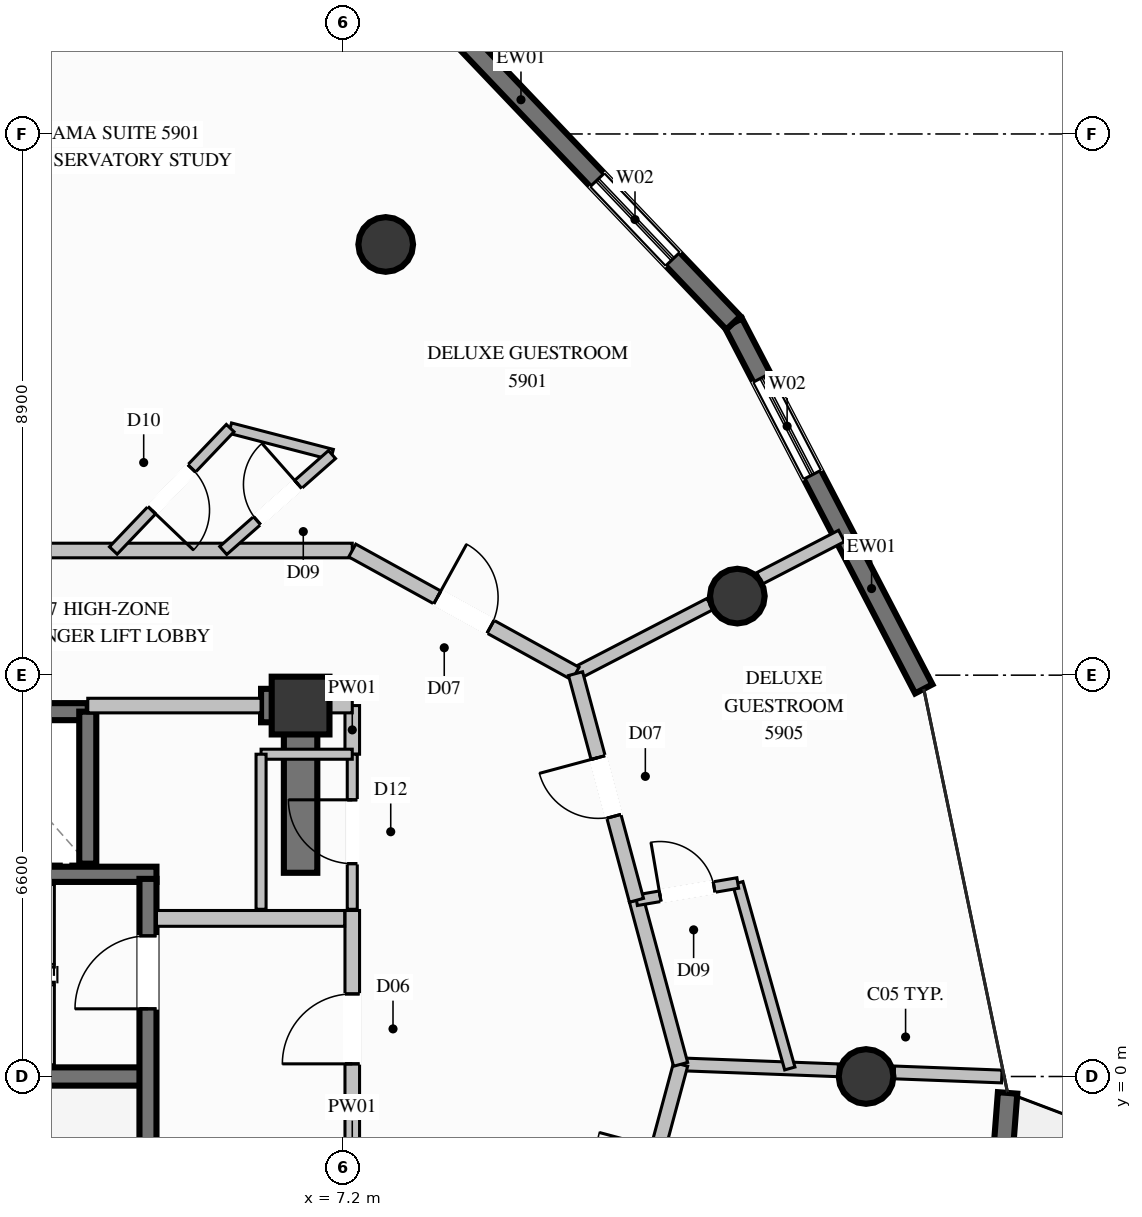
"""IFC4 building model, lengths in metres.
Left out: names, types, materials, properties, quantities, classifications, styles, units other than length and angle.
Written with IfcOpenShell. Run it as: python <this file> out.ifc"""

import sys

from ifc_helpers import new_model, si_unit, direction, frame, frame_2d, origin, origin_2d, place, context, subcontext, project, spatial, rectangle, circle, extrude, element, fill, save


model = new_model("IFC4")
c1 = context("Model", 3, precision=1e-05, world=origin(), true_north=direction((0.0, 1.0)))
c2 = subcontext(c1, "Body", "Model", "MODEL_VIEW")
j1 = project(units=[si_unit("LENGTHUNIT", "METRE"), si_unit("PLANEANGLEUNIT", "RADIAN")], contexts=[c1])
p1 = place(None, origin())
s1 = spatial("IfcSite", under=j1, at=p1, CompositionType="ELEMENT")
p2 = place(p1, origin())
s2 = spatial("IfcBuilding", under=s1, at=p2, CompositionType="ELEMENT")
p3 = place(p2, frame((0.0, 0.0, 220.0)))
s3 = spatial("IfcBuildingStorey", under=s2, at=p3, CompositionType="ELEMENT", Elevation=220.0)
p4 = place(p3, frame((6.5, 6.1, 0.0), z_axis=(0.0, 0.0, 1.0), x_axis=(1.0, 0.0, 0.0)))
e1 = element("IfcColumn", 1, at=p4, inside=s3, PredefinedType="COLUMN", context=c2, shape_type="SweptSolid", body=[
    extrude(rectangle(XDim=0.95, YDim=0.95, at=origin_2d()), origin(), (0.0, 0.0, 1.0), 3.6),
])
p5 = place(p3, frame((-3.99, 0.0, 0.0), z_axis=(0.0, 0.0, 1.0), x_axis=(1.0, 0.0, 0.0)))
e2 = element("IfcWall", 2, at=p5, inside=s3, PredefinedType="SHEAR", context=c2, shape_type="SweptSolid", body=[
    extrude(rectangle(XDim=7.98, YDim=0.3, at=frame_2d((3.99, 0.0))), origin(), (0.0, 0.0, 1.0), 3.6),
])
p6 = place(p3, frame((-4.13, 3.325, 0.0), z_axis=(0.0, 0.0, 1.0), x_axis=(1.0, 0.0, 0.0)))
e3 = element("IfcWall", 3, at=p6, inside=s3, PredefinedType="SOLIDWALL", context=c2, shape_type="SweptSolid", body=[
    extrude(rectangle(XDim=8.26, YDim=0.25, at=frame_2d((4.13, 0.0))), origin(), (0.0, 0.0, 1.0), 3.6),
])
p7 = place(p3, frame((5.85, 6.1, 0.0), z_axis=(0.0, 0.0, 1.0), x_axis=(1.0, 0.0, 0.0)))
e4 = element("IfcWall", 4, at=p7, inside=s3, PredefinedType="SHEAR", context=c2, shape_type="SweptSolid", body=[
    extrude(rectangle(XDim=0.375, YDim=0.55, at=frame_2d((0.188, 0.0))), origin(), (0.0, 0.0, 1.0), 3.6),
])
p8 = place(p3, frame((6.5, 3.35, 0.0), z_axis=(0.0, 0.0, 1.0), x_axis=(0.0, 1.0, 0.0)))
e5 = element("IfcWall", 5, at=p8, inside=s3, PredefinedType="SHEAR", context=c2, shape_type="SweptSolid", body=[
    extrude(rectangle(XDim=3.025, YDim=0.55, at=frame_2d((1.512, 0.0))), origin(), (0.0, 0.0, 1.0), 3.6),
])
for number, where, z_axis, x_axis in (
    (6, (15.8, 0.0, 0.0), (0.0, 0.0, 1.0), (1.0, 0.0, 0.0)),
    (7, (13.683, 7.9, 0.0), (0.0, 0.0, 1.0), (1.0, 0.0, 0.0)),
    (8, (7.9, 13.683, 0.0), (0.0, 0.0, 1.0), (1.0, 0.0, 0.0)),
):
    element("IfcColumn", number, at=place(p3, frame(where, z_axis=z_axis, x_axis=x_axis)), inside=s3, PredefinedType="COLUMN", context=c2, shape_type="SweptSolid", body=[
        extrude(circle(Radius=0.45, at=origin_2d()), origin(), (0.0, 0.0, 1.0), 3.6),
    ])
p9 = place(p3, frame((18.128, -0.27, 0.0), z_axis=(0.0, 0.0, 1.0), x_axis=(-0.076702125221, -0.997054052691, 0.0)))
e9 = element("IfcWall", 9, at=p9, inside=s3, PredefinedType="SOLIDWALL", context=c2, shape_type="SweptSolid", body=[
    extrude(rectangle(XDim=6.636, YDim=0.32, at=frame_2d((3.318, 0.0))), origin(), (0.0, 0.0, 1.0), 3.36),
])
p10 = place(p9, frame((2.518, 0.0, 0.0)))
e10 = element("IfcOpeningElement", 10, at=p10, cuts=e9, PredefinedType="OPENING", context=c2, shape_type="SweptSolid", body=[
    extrude(rectangle(XDim=1.6, YDim=2.3, at=frame_2d((0.8, 1.15))), frame((0.0, 0.17, 0.0), z_axis=(0.0, -1.0, 0.0), x_axis=(1.0, 0.0, 0.0)), (0.0, 0.0, 1.0), 0.34),
])
p11 = place(p3, frame((13.618, 12.393, 0.0), z_axis=(0.0, 0.0, 1.0), x_axis=(0.461492088822, -0.887144324197, 0.0)))
e11 = element("IfcWall", 11, at=p11, inside=s3, PredefinedType="SOLIDWALL", context=c2, shape_type="SweptSolid", body=[
    extrude(rectangle(XDim=6.785, YDim=0.32, at=frame_2d((3.392, 0.0))), origin(), (0.0, 0.0, 1.0), 3.36),
])
p12 = place(p11, frame((1.015, 0.0, 0.35)))
e12 = element("IfcOpeningElement", 12, at=p12, cuts=e11, PredefinedType="OPENING", context=c2, shape_type="SweptSolid", body=[
    extrude(rectangle(XDim=1.8, YDim=2.6, at=frame_2d((0.9, 1.3))), frame((0.0, 0.17, 0.0), z_axis=(0.0, -1.0, 0.0), x_axis=(1.0, 0.0, 0.0)), (0.0, 0.0, 1.0), 0.34),
])
p13 = place(p3, frame((9.042, 17.2, 0.0), z_axis=(0.0, 0.0, 1.0), x_axis=(0.689492567569, -0.724292757983, 0.0)))
e13 = element("IfcWall", 13, at=p13, inside=s3, PredefinedType="SOLIDWALL", context=c2, shape_type="SweptSolid", body=[
    extrude(rectangle(XDim=6.637, YDim=0.32, at=frame_2d((3.318, 0.0))), origin(), (0.0, 0.0, 1.0), 3.36),
])
p14 = place(p13, frame((3.39, 0.0, 0.35)))
e14 = element("IfcOpeningElement", 14, at=p14, cuts=e13, PredefinedType="OPENING", context=c2, shape_type="SweptSolid", body=[
    extrude(rectangle(XDim=1.8, YDim=2.6, at=frame_2d((0.9, 1.3))), frame((0.0, 0.17, 0.0), z_axis=(0.0, -1.0, 0.0), x_axis=(1.0, 0.0, 0.0)), (0.0, 0.0, 1.0), 0.34),
])
p15 = place(p3, frame((3.0, 6.0, 0.0), z_axis=(0.0, 0.0, 1.0), x_axis=(-1.0, 0.0, 0.0)))
e15 = element("IfcWall", 15, at=p15, inside=s3, PredefinedType="SOLIDWALL", context=c2, shape_type="SweptSolid", body=[
    extrude(rectangle(XDim=2.2, YDim=0.28, at=frame_2d((1.1, 0.0))), origin(), (0.0, 0.0, 1.0), 3.36),
])
p16 = place(p3, frame((3.0, 3.5, 0.0), z_axis=(0.0, 0.0, 1.0), x_axis=(0.0, 1.0, 0.0)))
e16 = element("IfcWall", 16, at=p16, inside=s3, PredefinedType="SOLIDWALL", context=c2, shape_type="SweptSolid", body=[
    extrude(rectangle(XDim=2.5, YDim=0.28, at=frame_2d((1.25, 0.0))), origin(), (0.0, 0.0, 1.0), 3.36),
])
p17 = place(p3, frame((3.99, -2.21, 0.0), z_axis=(0.0, 0.0, 1.0), x_axis=(0.0, 1.0, 0.0)))
e17 = element("IfcWall", 17, at=p17, inside=s3, PredefinedType="SOLIDWALL", context=c2, shape_type="SweptSolid", body=[
    extrude(rectangle(XDim=5.46, YDim=0.28, at=frame_2d((2.73, 0.0))), origin(), (0.0, 0.0, 1.0), 3.36),
])
p18 = place(p17, frame((3.323, 0.0, 0.0)))
e18 = element("IfcOpeningElement", 18, at=p18, cuts=e17, PredefinedType="OPENING", context=c2, shape_type="SweptSolid", body=[
    extrude(rectangle(XDim=1.2, YDim=2.2, at=frame_2d((0.6, 1.1))), frame((0.0, 0.15, 0.0), z_axis=(0.0, -1.0, 0.0), x_axis=(1.0, 0.0, 0.0)), (0.0, 0.0, 1.0), 0.3),
])
p19 = place(p3, frame((7.35, -2.34, 0.0), z_axis=(0.0, 0.0, 1.0), x_axis=(0.0, 1.0, 0.0)))
e19 = element("IfcWall", 19, at=p19, inside=s3, PredefinedType="PARTITIONING", context=c2, shape_type="SweptSolid", body=[
    extrude(rectangle(XDim=5.07, YDim=0.24, at=frame_2d((2.535, 0.0))), origin(), (0.0, 0.0, 1.0), 2.445),
])
p20 = place(p19, frame((2.548, 0.0, 0.0)))
e20 = element("IfcOpeningElement", 20, at=p20, cuts=e19, PredefinedType="OPENING", context=c2, shape_type="SweptSolid", body=[
    extrude(rectangle(XDim=1.15, YDim=2.2, at=frame_2d((0.575, 1.1))), frame((0.0, 0.13, 0.0), z_axis=(0.0, -1.0, 0.0), x_axis=(1.0, 0.0, 0.0)), (0.0, 0.0, 1.0), 0.26),
])
p21 = place(p3, frame((4.13, 2.6, 0.0), z_axis=(0.0, 0.0, 1.0), x_axis=(1.0, 0.0, 0.0)))
e21 = element("IfcWall", 21, at=p21, inside=s3, PredefinedType="PARTITIONING", context=c2, shape_type="SweptSolid", body=[
    extrude(rectangle(XDim=3.095, YDim=0.26, at=frame_2d((1.548, 0.0))), origin(), (0.0, 0.0, 1.0), 3.36),
])
p22 = place(p3, frame((-5.75, 8.65, 0.0), z_axis=(0.0, 0.0, 1.0), x_axis=(1.0, 0.0, 0.0)))
e22 = element("IfcWall", 22, at=p22, inside=s3, PredefinedType="PARTITIONING", context=c2, shape_type="SweptSolid", body=[
    extrude(rectangle(XDim=13.1, YDim=0.24, at=frame_2d((6.55, 0.0))), origin(), (0.0, 0.0, 1.0), 3.36),
])
p23 = place(p3, frame((3.0, 6.1, 0.0), z_axis=(0.0, 0.0, 1.0), x_axis=(1.0, 0.0, 0.0)))
e23 = element("IfcWall", 23, at=p23, inside=s3, PredefinedType="PARTITIONING", context=c2, shape_type="SweptSolid", body=[
    extrude(rectangle(XDim=2.85, YDim=0.24, at=frame_2d((1.425, 0.0))), origin(), (0.0, 0.0, 1.0), 2.445),
])
p24 = place(p3, frame((7.35, 5.3, 0.0), z_axis=(0.0, 0.0, 1.0), x_axis=(0.0, 1.0, 0.0)))
e24 = element("IfcWall", 24, at=p24, inside=s3, PredefinedType="PARTITIONING", context=c2, shape_type="SweptSolid", body=[
    extrude(rectangle(XDim=0.8, YDim=0.24, at=frame_2d((0.4, 0.0))), origin(), (0.0, 0.0, 1.0), 2.445),
])
p25 = place(p3, frame((6.5, 6.1, 0.0), z_axis=(0.0, 0.0, 1.0), x_axis=(1.0, 0.0, 0.0)))
e25 = element("IfcWall", 25, at=p25, inside=s3, PredefinedType="PARTITIONING", context=c2, shape_type="SweptSolid", body=[
    extrude(rectangle(XDim=0.85, YDim=0.24, at=frame_2d((0.425, 0.0))), origin(), (0.0, 0.0, 1.0), 2.877),
])
p26 = place(p3, frame((7.35, 2.75, 0.0), z_axis=(0.0, 0.0, 1.0), x_axis=(0.0, 1.0, 0.0)))
e26 = element("IfcWall", 26, at=p26, inside=s3, PredefinedType="PARTITIONING", context=c2, shape_type="SweptSolid", body=[
    extrude(rectangle(XDim=2.55, YDim=0.165, at=frame_2d((1.275, 0.0))), origin(), (0.0, 0.0, 1.0), 3.36),
])
p27 = place(p26, frame((0.75, 0.0, 0.0)))
e27 = element("IfcOpeningElement", 27, at=p27, cuts=e26, PredefinedType="OPENING", context=c2, shape_type="SweptSolid", body=[
    extrude(rectangle(XDim=1.05, YDim=2.15, at=frame_2d((0.525, 1.075))), frame((0.0, 0.093, 0.0), z_axis=(0.0, -1.0, 0.0), x_axis=(1.0, 0.0, 0.0)), (0.0, 0.0, 1.0), 0.185),
])
p28 = place(p3, frame((7.35, 5.3, 0.0), z_axis=(0.0, 0.0, 1.0), x_axis=(-1.0, 0.0, 0.0)))
e28 = element("IfcWall", 28, at=p28, inside=s3, PredefinedType="PARTITIONING", context=c2, shape_type="SweptSolid", body=[
    extrude(rectangle(XDim=1.5, YDim=0.165, at=frame_2d((0.75, 0.0))), origin(), (0.0, 0.0, 1.0), 2.445),
])
p29 = place(p3, frame((5.85, 5.3, 0.0), z_axis=(0.0, 0.0, 1.0), x_axis=(0.0, -1.0, 0.0)))
e29 = element("IfcWall", 29, at=p29, inside=s3, PredefinedType="PARTITIONING", context=c2, shape_type="SweptSolid", body=[
    extrude(rectangle(XDim=2.55, YDim=0.165, at=frame_2d((1.275, 0.0))), origin(), (0.0, 0.0, 1.0), 2.445),
])
p30 = place(p3, frame((12.75, 0.2, 0.0), z_axis=(0.0, 0.0, 1.0), x_axis=(0.999286953718, -0.037756908362, 0.0)))
e30 = element("IfcWall", 30, at=p30, inside=s3, PredefinedType="PARTITIONING", context=c2, shape_type="SweptSolid", body=[
    extrude(rectangle(XDim=2.593, YDim=0.21, at=frame_2d((1.296, 0.0))), origin(), (0.0, 0.0, 1.0), 3.36),
])
p31 = place(p3, frame((16.265, 0.067, 0.0), z_axis=(0.0, 0.0, 1.0), x_axis=(0.999284239873, -0.037828665616, 0.0)))
e31 = element("IfcWall", 31, at=p31, inside=s3, PredefinedType="PARTITIONING", context=c2, shape_type="SweptSolid", body=[
    extrude(rectangle(XDim=1.768, YDim=0.21, at=frame_2d((0.884, 0.0))), origin(), (0.0, 0.0, 1.0), 3.36),
])
p32 = place(p3, frame((11.022, 6.625, 0.0), z_axis=(0.0, 0.0, 1.0), x_axis=(0.88806021567, 0.459727150975, 0.0)))
e32 = element("IfcWall", 32, at=p32, inside=s3, PredefinedType="PARTITIONING", context=c2, shape_type="SweptSolid", body=[
    extrude(rectangle(XDim=2.489, YDim=0.21, at=frame_2d((1.244, 0.0))), origin(), (0.0, 0.0, 1.0), 2.877),
])
p33 = place(p3, frame((14.051, 8.193, 0.0), z_axis=(0.0, 0.0, 1.0), x_axis=(0.888183611241, 0.459488707939, 0.0)))
e33 = element("IfcWall", 33, at=p33, inside=s3, PredefinedType="PARTITIONING", context=c2, shape_type="SweptSolid", body=[
    extrude(rectangle(XDim=1.514, YDim=0.21, at=frame_2d((0.757, 0.0))), origin(), (0.0, 0.0, 1.0), 3.36),
])
p34 = place(p3, frame((5.342, 10.663, 0.0), z_axis=(0.0, 0.0, 1.0), x_axis=(0.967886377615, -0.251388066595, 0.0)))
e34 = element("IfcWall", 34, at=p34, inside=s3, PredefinedType="PLUMBINGWALL", context=c2, shape_type="SweptSolid", body=[
    extrude(rectangle(XDim=1.731, YDim=0.175, at=frame_2d((0.865, 0.0))), origin(), (0.0, 0.0, 1.0), 3.36),
])
p35 = place(p3, frame((5.342, 10.663, 0.0), z_axis=(0.0, 0.0, 1.0), x_axis=(-0.690559187333, -0.723275887051, 0.0)))
e35 = element("IfcWall", 35, at=p35, inside=s3, PredefinedType="PLUMBINGWALL", context=c2, shape_type="SweptSolid", body=[
    extrude(rectangle(XDim=2.783, YDim=0.175, at=frame_2d((1.392, 0.0))), origin(), (0.0, 0.0, 1.0), 3.36),
])
p36 = place(p35, frame((0.917, 0.0, 0.0)))
e36 = element("IfcOpeningElement", 36, at=p36, cuts=e35, PredefinedType="OPENING", context=c2, shape_type="SweptSolid", body=[
    extrude(rectangle(XDim=0.95, YDim=2.1, at=frame_2d((0.475, 1.05))), frame((0.0, 0.098, 0.0), z_axis=(0.0, -1.0, 0.0), x_axis=(1.0, 0.0, 0.0)), (0.0, 0.0, 1.0), 0.195),
])
p37 = place(p3, frame((5.228, 8.65, 0.0), z_axis=(0.0, 0.0, 1.0), x_axis=(0.749933416173, 0.66151331907, 0.0)))
e37 = element("IfcWall", 37, at=p37, inside=s3, PredefinedType="PLUMBINGWALL", context=c2, shape_type="SweptSolid", body=[
    extrude(rectangle(XDim=2.386, YDim=0.175, at=frame_2d((1.193, 0.0))), origin(), (0.0, 0.0, 1.0), 3.36),
])
p38 = place(p37, frame((0.743, 0.0, 0.0)))
e38 = element("IfcOpeningElement", 38, at=p38, cuts=e37, PredefinedType="OPENING", context=c2, shape_type="SweptSolid", body=[
    extrude(rectangle(XDim=0.9, YDim=2.1, at=frame_2d((0.45, 1.05))), frame((0.0, 0.098, 0.0), z_axis=(0.0, -1.0, 0.0), x_axis=(1.0, 0.0, 0.0)), (0.0, 0.0, 1.0), 0.195),
])
p39 = place(p3, frame((7.35, 8.65, 0.0), z_axis=(0.0, 0.0, 1.0), x_axis=(0.875674474849, -0.482901867979, 0.0)))
e39 = element("IfcWall", 39, at=p39, inside=s3, PredefinedType="PARTITIONING", context=c2, shape_type="SweptSolid", body=[
    extrude(rectangle(XDim=4.193, YDim=0.24, at=frame_2d((2.097, 0.0))), origin(), (0.0, 0.0, 1.0), 3.36),
])
p40 = place(p39, frame((1.597, 0.0, 0.0)))
e40 = element("IfcOpeningElement", 40, at=p40, cuts=e39, PredefinedType="OPENING", context=c2, shape_type="SweptSolid", body=[
    extrude(rectangle(XDim=1.0, YDim=2.2, at=frame_2d((0.5, 1.1))), frame((0.0, 0.13, 0.0), z_axis=(0.0, -1.0, 0.0), x_axis=(1.0, 0.0, 0.0)), (0.0, 0.0, 1.0), 0.26),
])
p41 = place(p3, frame((11.748, -3.526, 0.0), z_axis=(0.0, 0.0, 1.0), x_axis=(0.259694339612, 0.965690866672, 0.0)))
e41 = element("IfcWall", 41, at=p41, inside=s3, PredefinedType="PARTITIONING", context=c2, shape_type="SweptSolid", body=[
    extrude(rectangle(XDim=3.858, YDim=0.24, at=frame_2d((1.929, 0.0))), origin(), (0.0, 0.0, 1.0), 3.36),
])
p42 = place(p41, frame((1.429, 0.0, 0.0)))
e42 = element("IfcOpeningElement", 42, at=p42, cuts=e41, PredefinedType="OPENING", context=c2, shape_type="SweptSolid", body=[
    extrude(rectangle(XDim=1.0, YDim=2.2, at=frame_2d((0.5, 1.1))), frame((0.0, 0.13, 0.0), z_axis=(0.0, -1.0, 0.0), x_axis=(1.0, 0.0, 0.0)), (0.0, 0.0, 1.0), 0.26),
])
p43 = place(p3, frame((12.75, 0.2, 0.0), z_axis=(0.0, 0.0, 1.0), x_axis=(-0.259870061474, 0.965643594267, 0.0)))
e43 = element("IfcWall", 43, at=p43, inside=s3, PredefinedType="PARTITIONING", context=c2, shape_type="SweptSolid", body=[
    extrude(rectangle(XDim=2.794, YDim=0.24, at=frame_2d((1.397, 0.0))), origin(), (0.0, 0.0, 1.0), 3.36),
])
p44 = place(p3, frame((14.546, 0.132, 0.0), z_axis=(0.0, 0.0, 1.0), x_axis=(-0.270218787855, 0.962798944064, 0.0)))
e44 = element("IfcWall", 44, at=p44, inside=s3, PredefinedType="PLUMBINGWALL", context=c2, shape_type="SweptSolid", body=[
    extrude(rectangle(XDim=3.168, YDim=0.175, at=frame_2d((1.584, 0.0))), origin(), (0.0, 0.0, 1.0), 3.36),
])
p45 = place(p3, frame((12.024, 2.898, 0.0), z_axis=(0.0, 0.0, 1.0), x_axis=(0.985786066323, 0.168005450635, 0.0)))
e45 = element("IfcWall", 45, at=p45, inside=s3, PredefinedType="PLUMBINGWALL", context=c2, shape_type="SweptSolid", body=[
    extrude(rectangle(XDim=1.69, YDim=0.175, at=frame_2d((0.845, 0.0))), origin(), (0.0, 0.0, 1.0), 3.36),
])
p46 = place(p45, frame((0.395, 0.0, 0.0)))
e46 = element("IfcOpeningElement", 46, at=p46, cuts=e45, PredefinedType="OPENING", context=c2, shape_type="SweptSolid", body=[
    extrude(rectangle(XDim=0.9, YDim=2.1, at=frame_2d((0.45, 1.05))), frame((0.0, 0.098, 0.0), z_axis=(0.0, -1.0, 0.0), x_axis=(1.0, 0.0, 0.0)), (0.0, 0.0, 1.0), 0.195),
])
p47 = place(p3, frame((12.024, 2.898, 0.0), z_axis=(0.0, 0.0, 1.0), x_axis=(-0.259615016843, 0.965712194719, 0.0)))
e47 = element("IfcWall", 47, at=p47, inside=s3, PredefinedType="PARTITIONING", context=c2, shape_type="SweptSolid", body=[
    extrude(rectangle(XDim=3.859, YDim=0.24, at=frame_2d((1.93, 0.0))), origin(), (0.0, 0.0, 1.0), 3.36),
])
p48 = place(p47, frame((1.43, 0.0, 0.0)))
e48 = element("IfcOpeningElement", 48, at=p48, cuts=e47, PredefinedType="OPENING", context=c2, shape_type="SweptSolid", body=[
    extrude(rectangle(XDim=1.0, YDim=2.2, at=frame_2d((0.5, 1.1))), frame((0.0, 0.13, 0.0), z_axis=(0.0, -1.0, 0.0), x_axis=(1.0, 0.0, 0.0)), (0.0, 0.0, 1.0), 0.26),
])
p49 = place(p12, origin())
e49 = element("IfcWindow", 49, at=p49, inside=s3, PartitioningType="SINGLE_PANEL", PredefinedType="WINDOW", context=c2, shape_type="SweptSolid", body=[
    extrude(rectangle(XDim=1.8, YDim=2.6, at=frame_2d((0.9, 1.3))), frame((0.0, 0.03, 0.0), z_axis=(0.0, -1.0, 0.0), x_axis=(1.0, 0.0, 0.0)), (0.0, 0.0, 1.0), 0.06),
])
fill(e12, e49)
p50 = place(p14, origin())
e50 = element("IfcWindow", 50, at=p50, inside=s3, PartitioningType="SINGLE_PANEL", PredefinedType="WINDOW", context=c2, shape_type="SweptSolid", body=[
    extrude(rectangle(XDim=1.8, YDim=2.6, at=frame_2d((0.9, 1.3))), frame((0.0, 0.03, 0.0), z_axis=(0.0, -1.0, 0.0), x_axis=(1.0, 0.0, 0.0)), (0.0, 0.0, 1.0), 0.06),
])
fill(e14, e50)
p51 = place(p18, origin())
e51 = element("IfcDoor", 51, at=p51, inside=s3, OperationType="SINGLE_SWING_LEFT", PredefinedType="DOOR", context=c2, shape_type="SweptSolid", body=[
    extrude(rectangle(XDim=1.2, YDim=2.2, at=frame_2d((0.6, 1.1))), frame((0.0, 0.025, 0.0), z_axis=(0.0, -1.0, 0.0), x_axis=(1.0, 0.0, 0.0)), (0.0, 0.0, 1.0), 0.05),
])
fill(e18, e51)
p52 = place(p20, origin())
e52 = element("IfcDoor", 52, at=p52, inside=s3, OperationType="SINGLE_SWING_LEFT", PredefinedType="DOOR", context=c2, shape_type="SweptSolid", body=[
    extrude(rectangle(XDim=1.15, YDim=2.2, at=frame_2d((0.575, 1.1))), frame((0.0, 0.025, 0.0), z_axis=(0.0, -1.0, 0.0), x_axis=(1.0, 0.0, 0.0)), (0.0, 0.0, 1.0), 0.05),
])
fill(e20, e52)
p53 = place(p27, origin())
e53 = element("IfcDoor", 53, at=p53, inside=s3, OperationType="SINGLE_SWING_RIGHT", PredefinedType="DOOR", context=c2, shape_type="SweptSolid", body=[
    extrude(rectangle(XDim=1.05, YDim=2.15, at=frame_2d((0.525, 1.075))), frame((0.0, 0.025, 0.0), z_axis=(0.0, -1.0, 0.0), x_axis=(1.0, 0.0, 0.0)), (0.0, 0.0, 1.0), 0.05),
])
fill(e27, e53)
p54 = place(p38, origin())
e54 = element("IfcDoor", 54, at=p54, inside=s3, OperationType="SINGLE_SWING_RIGHT", PredefinedType="DOOR", context=c2, shape_type="SweptSolid", body=[
    extrude(rectangle(XDim=0.9, YDim=2.1, at=frame_2d((0.45, 1.05))), frame((0.0, 0.025, 0.0), z_axis=(0.0, -1.0, 0.0), x_axis=(1.0, 0.0, 0.0)), (0.0, 0.0, 1.0), 0.05),
])
fill(e38, e54)
p55 = place(p40, origin())
e55 = element("IfcDoor", 55, at=p55, inside=s3, OperationType="SINGLE_SWING_LEFT", PredefinedType="DOOR", context=c2, shape_type="SweptSolid", body=[
    extrude(rectangle(XDim=1.0, YDim=2.2, at=frame_2d((0.5, 1.1))), frame((0.0, 0.025, 0.0), z_axis=(0.0, -1.0, 0.0), x_axis=(1.0, 0.0, 0.0)), (0.0, 0.0, 1.0), 0.05),
])
fill(e40, e55)
p56 = place(p36, origin())
e56 = element("IfcDoor", 56, at=p56, inside=s3, OperationType="SINGLE_SWING_RIGHT", PredefinedType="DOOR", context=c2, shape_type="SweptSolid", body=[
    extrude(rectangle(XDim=0.95, YDim=2.1, at=frame_2d((0.475, 1.05))), frame((0.0, 0.025, 0.0), z_axis=(0.0, -1.0, 0.0), x_axis=(1.0, 0.0, 0.0)), (0.0, 0.0, 1.0), 0.05),
])
fill(e36, e56)
p57 = place(p46, origin())
e57 = element("IfcDoor", 57, at=p57, inside=s3, OperationType="SINGLE_SWING_LEFT", PredefinedType="DOOR", context=c2, shape_type="SweptSolid", body=[
    extrude(rectangle(XDim=0.9, YDim=2.1, at=frame_2d((0.45, 1.05))), frame((0.0, 0.025, 0.0), z_axis=(0.0, -1.0, 0.0), x_axis=(1.0, 0.0, 0.0)), (0.0, 0.0, 1.0), 0.05),
])
fill(e46, e57)
p58 = place(p48, origin())
e58 = element("IfcDoor", 58, at=p58, inside=s3, OperationType="SINGLE_SWING_RIGHT", PredefinedType="DOOR", context=c2, shape_type="SweptSolid", body=[
    extrude(rectangle(XDim=1.0, YDim=2.2, at=frame_2d((0.5, 1.1))), frame((0.0, 0.025, 0.0), z_axis=(0.0, -1.0, 0.0), x_axis=(1.0, 0.0, 0.0)), (0.0, 0.0, 1.0), 0.05),
])
fill(e48, e58)
save(model, sys.argv[1])
